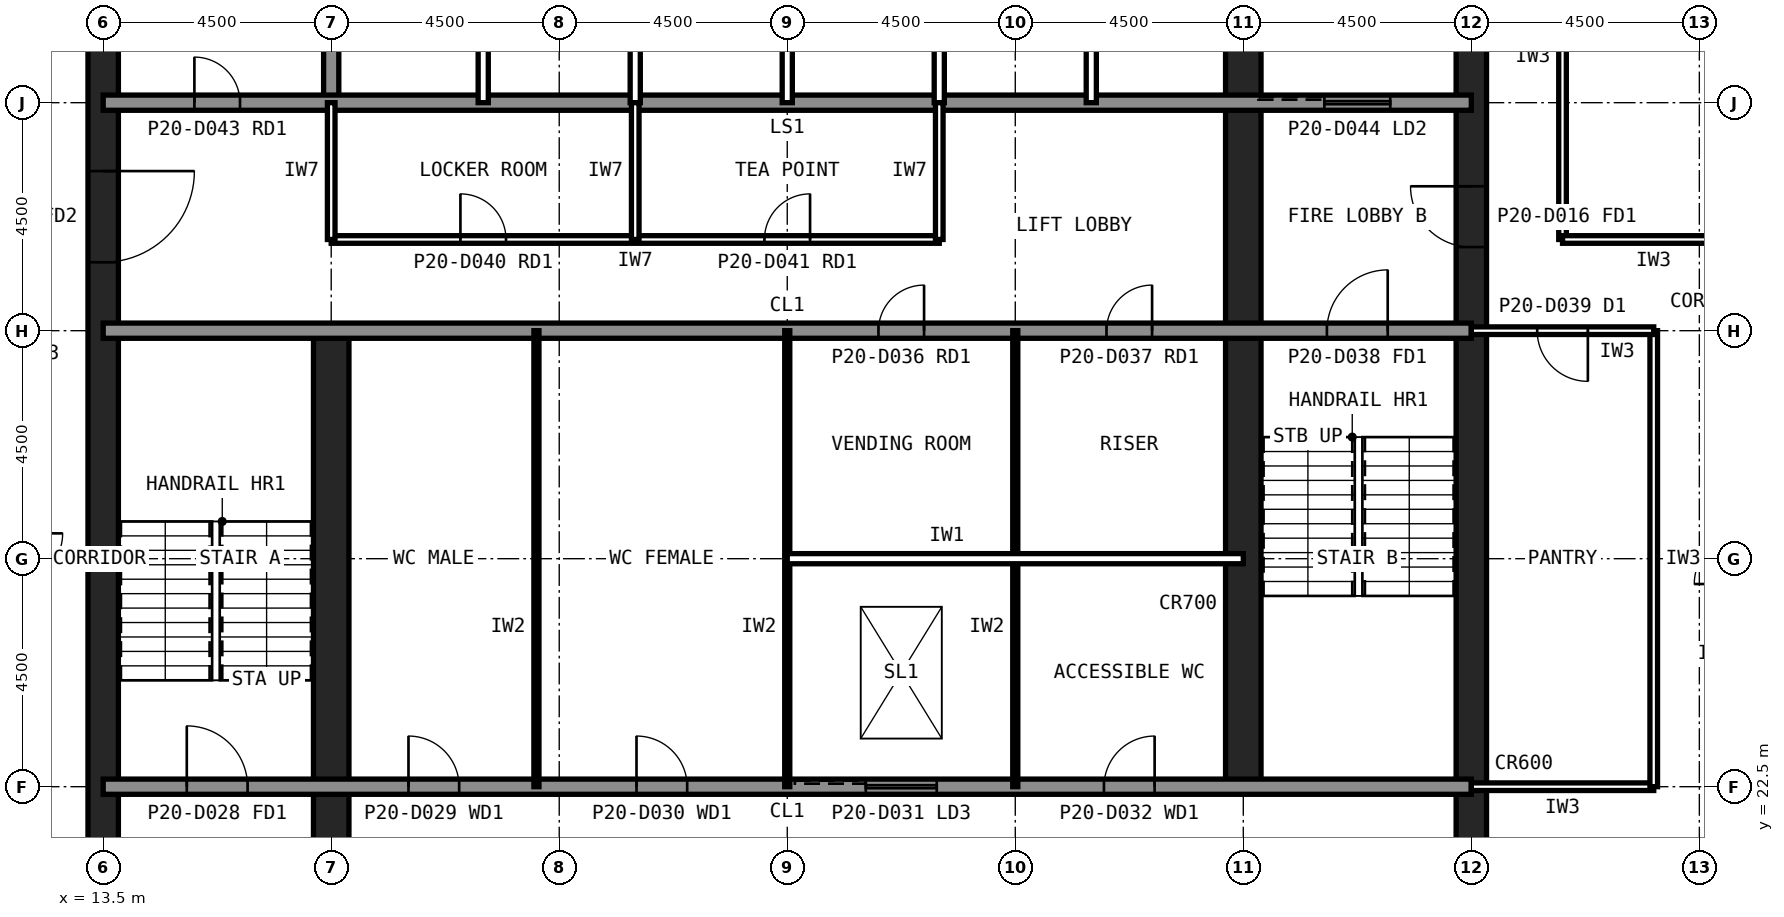
"""IFC4 building model, lengths in metres.
Left out: names, types, materials, properties, quantities, classifications, styles, units other than length and angle.
Written with IfcOpenShell. Run it as: python <this file> out.ifc"""

import sys

from ifc_helpers import new_model, si_unit, direction, frame, frame_2d, origin, place, context, subcontext, project, spatial, rectangle, extrude, element, fill, save


model = new_model("IFC4")
c1 = context("Model", 3, precision=1e-05, world=origin(), true_north=direction((0.0, 1.0)))
c2 = subcontext(c1, "Body", "Model", "MODEL_VIEW")
j1 = project(units=[si_unit("LENGTHUNIT", "METRE"), si_unit("PLANEANGLEUNIT", "RADIAN")], contexts=[c1])
p1 = place(None, origin())
s1 = spatial("IfcSite", under=j1, at=p1, CompositionType="ELEMENT")
p2 = place(p1, origin())
s2 = spatial("IfcBuilding", under=s1, at=p2, CompositionType="ELEMENT")
p3 = place(p2, frame((0.0, 0.0, 87.8)))
s3 = spatial("IfcBuildingStorey", under=s2, at=p3, CompositionType="ELEMENT", Elevation=87.8)
p4 = place(p3, frame((40.5, 13.5, 0.0), z_axis=(0.0, 0.0, 1.0), x_axis=(0.0, 1.0, 0.0)))
e1 = element("IfcWall", 1, at=p4, inside=s3, PredefinedType="SHEAR", context=c2, shape_type="SweptSolid", body=[
    extrude(rectangle(XDim=27.0, YDim=0.6, at=frame_2d((13.5, 0.0))), origin(), (0.0, 0.0, 1.0), 4.2),
])
p5 = place(p4, frame((5.85, 0.0, 0.0)))
e2 = element("IfcOpeningElement", 2, at=p5, cuts=e1, PredefinedType="OPENING", context=c2, shape_type="SweptSolid", body=[
    extrude(rectangle(XDim=1.8, YDim=2.1, at=frame_2d((0.9, 1.05))), frame((0.0, 0.31, 0.0), z_axis=(0.0, -1.0, 0.0), x_axis=(1.0, 0.0, 0.0)), (0.0, 0.0, 1.0), 0.62),
])
p6 = place(p4, frame((19.65, 0.0, 0.0)))
e3 = element("IfcOpeningElement", 3, at=p6, cuts=e1, PredefinedType="OPENING", context=c2, shape_type="SweptSolid", body=[
    extrude(rectangle(XDim=1.2, YDim=2.1, at=frame_2d((0.6, 1.05))), frame((0.0, 0.31, 0.0), z_axis=(0.0, -1.0, 0.0), x_axis=(1.0, 0.0, 0.0)), (0.0, 0.0, 1.0), 0.62),
])
p7 = place(p3, frame((13.5, 40.5, 0.0), z_axis=(0.0, 0.0, 1.0), x_axis=(0.0, -1.0, 0.0)))
e4 = element("IfcWall", 4, at=p7, inside=s3, PredefinedType="SHEAR", context=c2, shape_type="SweptSolid", body=[
    extrude(rectangle(XDim=27.0, YDim=0.6, at=frame_2d((13.5, 0.0))), origin(), (0.0, 0.0, 1.0), 4.2),
])
p8 = place(p7, frame((19.65, 0.0, 0.0)))
e5 = element("IfcOpeningElement", 5, at=p8, cuts=e4, PredefinedType="OPENING", context=c2, shape_type="SweptSolid", body=[
    extrude(rectangle(XDim=1.2, YDim=2.1, at=frame_2d((0.6, 1.05))), frame((0.0, 0.31, 0.0), z_axis=(0.0, -1.0, 0.0), x_axis=(1.0, 0.0, 0.0)), (0.0, 0.0, 1.0), 0.62),
])
p9 = place(p7, frame((5.85, 0.0, 0.0)))
e6 = element("IfcOpeningElement", 6, at=p9, cuts=e4, PredefinedType="OPENING", context=c2, shape_type="SweptSolid", body=[
    extrude(rectangle(XDim=1.8, YDim=2.1, at=frame_2d((0.9, 1.05))), frame((0.0, 0.31, 0.0), z_axis=(0.0, -1.0, 0.0), x_axis=(1.0, 0.0, 0.0)), (0.0, 0.0, 1.0), 0.62),
])
p10 = place(p3, frame((18.0, 13.5, 0.0), z_axis=(0.0, 0.0, 1.0), x_axis=(0.0, 1.0, 0.0)))
e7 = element("IfcWall", 7, at=p10, inside=s3, PredefinedType="SHEAR", context=c2, shape_type="SweptSolid", body=[
    extrude(rectangle(XDim=18.0, YDim=0.7, at=frame_2d((9.0, 0.0))), origin(), (0.0, 0.0, 1.0), 4.2),
])
p11 = place(p3, frame((18.0, 36.0, 0.0), z_axis=(0.0, 0.0, 1.0), x_axis=(0.0, 1.0, 0.0)))
e8 = element("IfcWall", 8, at=p11, inside=s3, PredefinedType="SOLIDWALL", context=c2, shape_type="SweptSolid", body=[
    extrude(rectangle(XDim=4.5, YDim=0.3, at=frame_2d((2.25, 0.0))), origin(), (0.0, 0.0, 1.0), 4.04),
])
p12 = place(p3, frame((36.0, 22.5, 0.0), z_axis=(0.0, 0.0, 1.0), x_axis=(0.0, 1.0, 0.0)))
e9 = element("IfcWall", 9, at=p12, inside=s3, PredefinedType="SHEAR", context=c2, shape_type="SweptSolid", body=[
    extrude(rectangle(XDim=18.0, YDim=0.7, at=frame_2d((9.0, 0.0))), origin(), (0.0, 0.0, 1.0), 4.2),
])
p13 = place(p3, frame((13.5, 36.0, 0.0), z_axis=(0.0, 0.0, 1.0), x_axis=(1.0, 0.0, 0.0)))
e10 = element("IfcWall", 10, at=p13, inside=s3, PredefinedType="SOLIDWALL", context=c2, shape_type="SweptSolid", body=[
    extrude(rectangle(XDim=27.0, YDim=0.3, at=frame_2d((13.5, 0.0))), origin(), (0.0, 0.0, 1.0), 4.04),
])
p14 = place(p13, frame((1.8, 0.0, 0.0)))
e11 = element("IfcOpeningElement", 11, at=p14, cuts=e10, PredefinedType="OPENING", context=c2, shape_type="SweptSolid", body=[
    extrude(rectangle(XDim=0.9, YDim=2.1, at=frame_2d((0.45, 1.05))), frame((0.0, 0.16, 0.0), z_axis=(0.0, -1.0, 0.0), x_axis=(1.0, 0.0, 0.0)), (0.0, 0.0, 1.0), 0.32),
])
p15 = place(p13, frame((24.1, 0.0, 0.0)))
e12 = element("IfcOpeningElement", 12, at=p15, cuts=e10, PredefinedType="OPENING", context=c2, shape_type="SweptSolid", body=[
    extrude(rectangle(XDim=1.3, YDim=2.2, at=frame_2d((0.65, 1.1))), frame((0.0, 0.16, 0.0), z_axis=(0.0, -1.0, 0.0), x_axis=(1.0, 0.0, 0.0)), (0.0, 0.0, 1.0), 0.32),
])
p16 = place(p3, frame((13.5, 22.5, 0.0), z_axis=(0.0, 0.0, 1.0), x_axis=(1.0, 0.0, 0.0)))
e13 = element("IfcWall", 13, at=p16, inside=s3, PredefinedType="SOLIDWALL", context=c2, shape_type="SweptSolid", body=[
    extrude(rectangle(XDim=27.0, YDim=0.3, at=frame_2d((13.5, 0.0))), origin(), (0.0, 0.0, 1.0), 4.04),
])
p17 = place(p16, frame((1.65, 0.0, 0.0)))
e14 = element("IfcOpeningElement", 14, at=p17, cuts=e13, PredefinedType="OPENING", context=c2, shape_type="SweptSolid", body=[
    extrude(rectangle(XDim=1.2, YDim=2.1, at=frame_2d((0.6, 1.05))), frame((0.0, 0.16, 0.0), z_axis=(0.0, -1.0, 0.0), x_axis=(1.0, 0.0, 0.0)), (0.0, 0.0, 1.0), 0.32),
])
p18 = place(p16, frame((6.025, 0.0, 0.0)))
e15 = element("IfcOpeningElement", 15, at=p18, cuts=e13, PredefinedType="OPENING", context=c2, shape_type="SweptSolid", body=[
    extrude(rectangle(XDim=1.0, YDim=2.1, at=frame_2d((0.5, 1.05))), frame((0.0, 0.16, 0.0), z_axis=(0.0, -1.0, 0.0), x_axis=(1.0, 0.0, 0.0)), (0.0, 0.0, 1.0), 0.32),
])
p19 = place(p16, frame((10.525, 0.0, 0.0)))
e16 = element("IfcOpeningElement", 16, at=p19, cuts=e13, PredefinedType="OPENING", context=c2, shape_type="SweptSolid", body=[
    extrude(rectangle(XDim=1.0, YDim=2.1, at=frame_2d((0.5, 1.05))), frame((0.0, 0.16, 0.0), z_axis=(0.0, -1.0, 0.0), x_axis=(1.0, 0.0, 0.0)), (0.0, 0.0, 1.0), 0.32),
])
p20 = place(p16, frame((19.75, 0.0, 0.0)))
e17 = element("IfcOpeningElement", 17, at=p20, cuts=e13, PredefinedType="OPENING", context=c2, shape_type="SweptSolid", body=[
    extrude(rectangle(XDim=1.0, YDim=2.1, at=frame_2d((0.5, 1.05))), frame((0.0, 0.16, 0.0), z_axis=(0.0, -1.0, 0.0), x_axis=(1.0, 0.0, 0.0)), (0.0, 0.0, 1.0), 0.32),
])
p21 = place(p16, frame((15.05, 0.0, 0.0)))
e18 = element("IfcOpeningElement", 18, at=p21, cuts=e13, PredefinedType="OPENING", context=c2, shape_type="SweptSolid", body=[
    extrude(rectangle(XDim=1.4, YDim=2.4, at=frame_2d((0.7, 1.2))), frame((0.0, 0.16, 0.0), z_axis=(0.0, -1.0, 0.0), x_axis=(1.0, 0.0, 0.0)), (0.0, 0.0, 1.0), 0.32),
])
p22 = place(p3, frame((13.5, 31.5, 0.0), z_axis=(0.0, 0.0, 1.0), x_axis=(1.0, 0.0, 0.0)))
e19 = element("IfcWall", 19, at=p22, inside=s3, PredefinedType="SOLIDWALL", context=c2, shape_type="SweptSolid", body=[
    extrude(rectangle(XDim=27.0, YDim=0.3, at=frame_2d((13.5, 0.0))), origin(), (0.0, 0.0, 1.0), 4.04),
])
p23 = place(p22, frame((24.15, 0.0, 0.0)))
e20 = element("IfcOpeningElement", 20, at=p23, cuts=e19, PredefinedType="OPENING", context=c2, shape_type="SweptSolid", body=[
    extrude(rectangle(XDim=1.2, YDim=2.1, at=frame_2d((0.6, 1.05))), frame((0.0, 0.16, 0.0), z_axis=(0.0, -1.0, 0.0), x_axis=(1.0, 0.0, 0.0)), (0.0, 0.0, 1.0), 0.32),
])
p24 = place(p22, frame((15.3, 0.0, 0.0)))
e21 = element("IfcOpeningElement", 21, at=p24, cuts=e19, PredefinedType="OPENING", context=c2, shape_type="SweptSolid", body=[
    extrude(rectangle(XDim=0.9, YDim=2.1, at=frame_2d((0.45, 1.05))), frame((0.0, 0.16, 0.0), z_axis=(0.0, -1.0, 0.0), x_axis=(1.0, 0.0, 0.0)), (0.0, 0.0, 1.0), 0.32),
])
p25 = place(p22, frame((19.8, 0.0, 0.0)))
e22 = element("IfcOpeningElement", 22, at=p25, cuts=e19, PredefinedType="OPENING", context=c2, shape_type="SweptSolid", body=[
    extrude(rectangle(XDim=0.9, YDim=2.1, at=frame_2d((0.45, 1.05))), frame((0.0, 0.16, 0.0), z_axis=(0.0, -1.0, 0.0), x_axis=(1.0, 0.0, 0.0)), (0.0, 0.0, 1.0), 0.32),
])
for number, where, z_axis, x_axis in (
    (23, (21.0, 36.0, 0.0), (0.0, 0.0, 1.0), (0.0, 1.0, 0.0)),
    (24, (24.0, 36.0, 0.0), (0.0, 0.0, 1.0), (0.0, 1.0, 0.0)),
    (25, (27.0, 36.0, 0.0), (0.0, 0.0, 1.0), (0.0, 1.0, 0.0)),
    (26, (30.0, 36.0, 0.0), (0.0, 0.0, 1.0), (0.0, 1.0, 0.0)),
    (27, (33.0, 36.0, 0.0), (0.0, 0.0, 1.0), (0.0, 1.0, 0.0)),
):
    element("IfcWall", number, at=place(p3, frame(where, z_axis=z_axis, x_axis=x_axis)), inside=s3, PredefinedType="PARTITIONING", context=c2, shape_type="SweptSolid", body=[
        extrude(rectangle(XDim=4.5, YDim=0.2, at=frame_2d((2.25, 0.0))), origin(), (0.0, 0.0, 1.0), 4.04),
    ])
for number, where, z_axis, x_axis in (
    (28, (22.05, 22.5, 0.0), (0.0, 0.0, 1.0), (0.0, 1.0, 0.0)),
    (29, (27.0, 22.5, 0.0), (0.0, 0.0, 1.0), (0.0, 1.0, 0.0)),
    (30, (31.5, 22.5, 0.0), (0.0, 0.0, 1.0), (0.0, 1.0, 0.0)),
):
    element("IfcWall", number, at=place(p3, frame(where, z_axis=z_axis, x_axis=x_axis)), inside=s3, PredefinedType="PLUMBINGWALL", context=c2, shape_type="SweptSolid", body=[
        extrude(rectangle(XDim=9.0, YDim=0.1, at=frame_2d((4.5, 0.0))), origin(), (0.0, 0.0, 1.0), 4.04),
    ])
p26 = place(p3, frame((27.0, 27.0, 0.0), z_axis=(0.0, 0.0, 1.0), x_axis=(1.0, 0.0, 0.0)))
e31 = element("IfcWall", 31, at=p26, inside=s3, PredefinedType="PARTITIONING", context=c2, shape_type="SweptSolid", body=[
    extrude(rectangle(XDim=9.0, YDim=0.2, at=frame_2d((4.5, 0.0))), origin(), (0.0, 0.0, 1.0), 4.04),
])
p27 = place(p3, frame((18.0, 33.3, 0.0), z_axis=(0.0, 0.0, 1.0), x_axis=(1.0, 0.0, 0.0)))
e32 = element("IfcWall", 32, at=p27, inside=s3, PredefinedType="PARTITIONING", context=c2, shape_type="SweptSolid", body=[
    extrude(rectangle(XDim=12.0, YDim=0.15, at=frame_2d((6.0, 0.0))), origin(), (0.0, 0.0, 1.0), 4.04),
])
p28 = place(p27, frame((2.55, 0.0, 0.0)))
e33 = element("IfcOpeningElement", 33, at=p28, cuts=e32, PredefinedType="OPENING", context=c2, shape_type="SweptSolid", body=[
    extrude(rectangle(XDim=0.9, YDim=2.1, at=frame_2d((0.45, 1.05))), frame((0.0, 0.085, 0.0), z_axis=(0.0, -1.0, 0.0), x_axis=(1.0, 0.0, 0.0)), (0.0, 0.0, 1.0), 0.17),
])
p29 = place(p27, frame((8.55, 0.0, 0.0)))
e34 = element("IfcOpeningElement", 34, at=p29, cuts=e32, PredefinedType="OPENING", context=c2, shape_type="SweptSolid", body=[
    extrude(rectangle(XDim=0.9, YDim=2.1, at=frame_2d((0.45, 1.05))), frame((0.0, 0.085, 0.0), z_axis=(0.0, -1.0, 0.0), x_axis=(1.0, 0.0, 0.0)), (0.0, 0.0, 1.0), 0.17),
])
for number, where, z_axis, x_axis in (
    (35, (18.0, 33.3, 0.0), (0.0, 0.0, 1.0), (0.0, 1.0, 0.0)),
    (36, (24.0, 33.3, 0.0), (0.0, 0.0, 1.0), (0.0, 1.0, 0.0)),
    (37, (30.0, 33.3, 0.0), (0.0, 0.0, 1.0), (0.0, 1.0, 0.0)),
):
    element("IfcWall", number, at=place(p3, frame(where, z_axis=z_axis, x_axis=x_axis)), inside=s3, PredefinedType="PARTITIONING", context=c2, shape_type="SweptSolid", body=[
        extrude(rectangle(XDim=2.7, YDim=0.15, at=frame_2d((1.35, 0.0))), origin(), (0.0, 0.0, 1.0), 4.04),
    ])
p30 = place(p3, frame((42.3, 33.3, 0.0), z_axis=(0.0, 0.0, 1.0), x_axis=(0.0, 1.0, 0.0)))
e38 = element("IfcWall", 38, at=p30, inside=s3, PredefinedType="PARTITIONING", context=c2, shape_type="SweptSolid", body=[
    extrude(rectangle(XDim=7.2, YDim=0.15, at=frame_2d((3.6, 0.0))), origin(), (0.0, 0.0, 1.0), 4.04),
])
p31 = place(p3, frame((45.9, 33.3, 0.0), z_axis=(0.0, 0.0, 1.0), x_axis=(-1.0, 0.0, 0.0)))
e39 = element("IfcWall", 39, at=p31, inside=s3, PredefinedType="PARTITIONING", context=c2, shape_type="SweptSolid", body=[
    extrude(rectangle(XDim=3.6, YDim=0.15, at=frame_2d((1.8, 0.0))), origin(), (0.0, 0.0, 1.0), 4.04),
])
p32 = place(p3, frame((40.5, 22.5, 0.0), z_axis=(0.0, 0.0, 1.0), x_axis=(1.0, 0.0, 0.0)))
e40 = element("IfcWall", 40, at=p32, inside=s3, PredefinedType="PARTITIONING", context=c2, shape_type="SweptSolid", body=[
    extrude(rectangle(XDim=3.6, YDim=0.15, at=frame_2d((1.8, 0.0))), origin(), (0.0, 0.0, 1.0), 3.189),
])
p33 = place(p3, frame((44.1, 22.5, 0.0), z_axis=(0.0, 0.0, 1.0), x_axis=(0.0, 1.0, 0.0)))
e41 = element("IfcWall", 41, at=p33, inside=s3, PredefinedType="PARTITIONING", context=c2, shape_type="SweptSolid", body=[
    extrude(rectangle(XDim=9.0, YDim=0.15, at=frame_2d((4.5, 0.0))), origin(), (0.0, 0.0, 1.0), 4.04),
])
p34 = place(p3, frame((44.1, 31.5, 0.0), z_axis=(0.0, 0.0, 1.0), x_axis=(-1.0, 0.0, 0.0)))
e42 = element("IfcWall", 42, at=p34, inside=s3, PredefinedType="PARTITIONING", context=c2, shape_type="SweptSolid", body=[
    extrude(rectangle(XDim=3.6, YDim=0.15, at=frame_2d((1.8, 0.0))), origin(), (0.0, 0.0, 1.0), 3.189),
])
p35 = place(p34, frame((1.3, 0.0, 0.0)))
e43 = element("IfcOpeningElement", 43, at=p35, cuts=e42, PredefinedType="OPENING", context=c2, shape_type="SweptSolid", body=[
    extrude(rectangle(XDim=1.0, YDim=2.1, at=frame_2d((0.5, 1.05))), frame((0.0, 0.085, 0.0), z_axis=(0.0, -1.0, 0.0), x_axis=(1.0, 0.0, 0.0)), (0.0, 0.0, 1.0), 0.17),
])
p36 = place(p9, origin())
e44 = element("IfcDoor", 44, at=p36, inside=s3, OperationType="SINGLE_SWING_LEFT", PredefinedType="DOOR", context=c2, shape_type="SweptSolid", body=[
    extrude(rectangle(XDim=1.8, YDim=2.1, at=frame_2d((0.9, 1.05))), frame((0.0, 0.025, 0.0), z_axis=(0.0, -1.0, 0.0), x_axis=(1.0, 0.0, 0.0)), (0.0, 0.0, 1.0), 0.05),
])
fill(e6, e44)
p37 = place(p6, origin())
e45 = element("IfcDoor", 45, at=p37, inside=s3, OperationType="SINGLE_SWING_RIGHT", PredefinedType="DOOR", context=c2, shape_type="SweptSolid", body=[
    extrude(rectangle(XDim=1.2, YDim=2.1, at=frame_2d((0.6, 1.05))), frame((0.0, 0.025, 0.0), z_axis=(0.0, -1.0, 0.0), x_axis=(1.0, 0.0, 0.0)), (0.0, 0.0, 1.0), 0.05),
])
fill(e3, e45)
p38 = place(p17, origin())
e46 = element("IfcDoor", 46, at=p38, inside=s3, OperationType="SINGLE_SWING_LEFT", PredefinedType="DOOR", context=c2, shape_type="SweptSolid", body=[
    extrude(rectangle(XDim=1.2, YDim=2.1, at=frame_2d((0.6, 1.05))), frame((0.0, 0.025, 0.0), z_axis=(0.0, -1.0, 0.0), x_axis=(1.0, 0.0, 0.0)), (0.0, 0.0, 1.0), 0.05),
])
fill(e14, e46)
p39 = place(p23, origin())
e47 = element("IfcDoor", 47, at=p39, inside=s3, OperationType="SINGLE_SWING_RIGHT", PredefinedType="DOOR", context=c2, shape_type="SweptSolid", body=[
    extrude(rectangle(XDim=1.2, YDim=2.1, at=frame_2d((0.6, 1.05))), frame((0.0, 0.025, 0.0), z_axis=(0.0, -1.0, 0.0), x_axis=(1.0, 0.0, 0.0)), (0.0, 0.0, 1.0), 0.05),
])
fill(e20, e47)
p40 = place(p18, origin())
e48 = element("IfcDoor", 48, at=p40, inside=s3, OperationType="SINGLE_SWING_LEFT", PredefinedType="DOOR", context=c2, shape_type="SweptSolid", body=[
    extrude(rectangle(XDim=1.0, YDim=2.1, at=frame_2d((0.5, 1.05))), frame((0.0, 0.025, 0.0), z_axis=(0.0, -1.0, 0.0), x_axis=(1.0, 0.0, 0.0)), (0.0, 0.0, 1.0), 0.05),
])
fill(e15, e48)
p41 = place(p19, origin())
e49 = element("IfcDoor", 49, at=p41, inside=s3, OperationType="SINGLE_SWING_LEFT", PredefinedType="DOOR", context=c2, shape_type="SweptSolid", body=[
    extrude(rectangle(XDim=1.0, YDim=2.1, at=frame_2d((0.5, 1.05))), frame((0.0, 0.025, 0.0), z_axis=(0.0, -1.0, 0.0), x_axis=(1.0, 0.0, 0.0)), (0.0, 0.0, 1.0), 0.05),
])
fill(e16, e49)
p42 = place(p20, origin())
e50 = element("IfcDoor", 50, at=p42, inside=s3, OperationType="SINGLE_SWING_RIGHT", PredefinedType="DOOR", context=c2, shape_type="SweptSolid", body=[
    extrude(rectangle(XDim=1.0, YDim=2.1, at=frame_2d((0.5, 1.05))), frame((0.0, 0.025, 0.0), z_axis=(0.0, -1.0, 0.0), x_axis=(1.0, 0.0, 0.0)), (0.0, 0.0, 1.0), 0.05),
])
fill(e17, e50)
p43 = place(p24, origin())
e51 = element("IfcDoor", 51, at=p43, inside=s3, OperationType="SINGLE_SWING_RIGHT", PredefinedType="DOOR", context=c2, shape_type="SweptSolid", body=[
    extrude(rectangle(XDim=0.9, YDim=2.1, at=frame_2d((0.45, 1.05))), frame((0.0, 0.025, 0.0), z_axis=(0.0, -1.0, 0.0), x_axis=(1.0, 0.0, 0.0)), (0.0, 0.0, 1.0), 0.05),
])
fill(e21, e51)
p44 = place(p25, origin())
e52 = element("IfcDoor", 52, at=p44, inside=s3, OperationType="SINGLE_SWING_RIGHT", PredefinedType="DOOR", context=c2, shape_type="SweptSolid", body=[
    extrude(rectangle(XDim=0.9, YDim=2.1, at=frame_2d((0.45, 1.05))), frame((0.0, 0.025, 0.0), z_axis=(0.0, -1.0, 0.0), x_axis=(1.0, 0.0, 0.0)), (0.0, 0.0, 1.0), 0.05),
])
fill(e22, e52)
p45 = place(p14, origin())
e53 = element("IfcDoor", 53, at=p45, inside=s3, OperationType="SINGLE_SWING_LEFT", PredefinedType="DOOR", context=c2, shape_type="SweptSolid", body=[
    extrude(rectangle(XDim=0.9, YDim=2.1, at=frame_2d((0.45, 1.05))), frame((0.0, 0.025, 0.0), z_axis=(0.0, -1.0, 0.0), x_axis=(1.0, 0.0, 0.0)), (0.0, 0.0, 1.0), 0.05),
])
fill(e11, e53)
p46 = place(p28, origin())
e54 = element("IfcDoor", 54, at=p46, inside=s3, OperationType="SINGLE_SWING_LEFT", PredefinedType="DOOR", context=c2, shape_type="SweptSolid", body=[
    extrude(rectangle(XDim=0.9, YDim=2.1, at=frame_2d((0.45, 1.05))), frame((0.0, 0.025, 0.0), z_axis=(0.0, -1.0, 0.0), x_axis=(1.0, 0.0, 0.0)), (0.0, 0.0, 1.0), 0.05),
])
fill(e33, e54)
p47 = place(p29, origin())
e55 = element("IfcDoor", 55, at=p47, inside=s3, OperationType="SINGLE_SWING_RIGHT", PredefinedType="DOOR", context=c2, shape_type="SweptSolid", body=[
    extrude(rectangle(XDim=0.9, YDim=2.1, at=frame_2d((0.45, 1.05))), frame((0.0, 0.025, 0.0), z_axis=(0.0, -1.0, 0.0), x_axis=(1.0, 0.0, 0.0)), (0.0, 0.0, 1.0), 0.05),
])
fill(e34, e55)
p48 = place(p15, origin())
e56 = element("IfcDoor", 56, at=p48, inside=s3, OperationType="SLIDING_TO_LEFT", PredefinedType="DOOR", context=c2, shape_type="SweptSolid", body=[
    extrude(rectangle(XDim=1.3, YDim=2.2, at=frame_2d((0.65, 1.1))), frame((0.0, 0.025, 0.0), z_axis=(0.0, -1.0, 0.0), x_axis=(1.0, 0.0, 0.0)), (0.0, 0.0, 1.0), 0.05),
])
fill(e12, e56)
p49 = place(p21, origin())
e57 = element("IfcDoor", 57, at=p49, inside=s3, OperationType="SLIDING_TO_LEFT", PredefinedType="DOOR", context=c2, shape_type="SweptSolid", body=[
    extrude(rectangle(XDim=1.4, YDim=2.4, at=frame_2d((0.7, 1.2))), frame((0.0, 0.025, 0.0), z_axis=(0.0, -1.0, 0.0), x_axis=(1.0, 0.0, 0.0)), (0.0, 0.0, 1.0), 0.05),
])
fill(e18, e57)
p50 = place(p35, origin())
e58 = element("IfcDoor", 58, at=p50, inside=s3, OperationType="SINGLE_SWING_LEFT", PredefinedType="DOOR", context=c2, shape_type="SweptSolid", body=[
    extrude(rectangle(XDim=1.0, YDim=2.1, at=frame_2d((0.5, 1.05))), frame((0.0, 0.025, 0.0), z_axis=(0.0, -1.0, 0.0), x_axis=(1.0, 0.0, 0.0)), (0.0, 0.0, 1.0), 0.05),
])
fill(e43, e58)
save(model, sys.argv[1])
